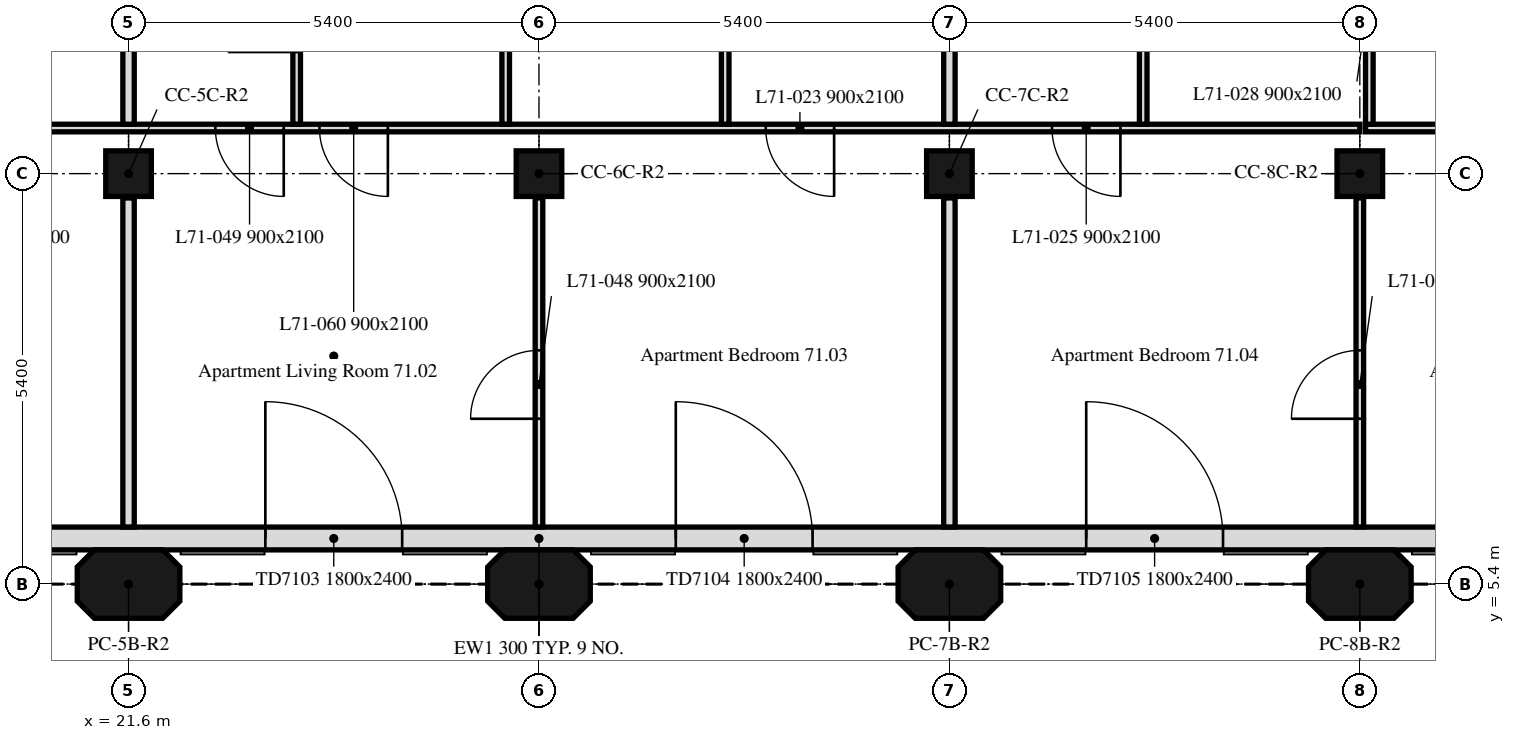
"""IFC4 building model, lengths in metres.
Left out: names, types, materials, properties, quantities, classifications, styles, units other than length and angle.
Written with IfcOpenShell. Run it as: python <this file> out.ifc"""

import sys

from ifc_helpers import new_model, si_unit, direction, frame, frame_2d, origin, origin_2d, place, context, subcontext, project, spatial, polyline, rectangle, outline, extrude, element, fill, save


model = new_model("IFC4")
c1 = context("Model", 3, precision=1e-05, world=origin(), true_north=direction((0.0, 1.0)))
c2 = subcontext(c1, "Body", "Model", "MODEL_VIEW")
j1 = project(units=[si_unit("LENGTHUNIT", "METRE"), si_unit("PLANEANGLEUNIT", "RADIAN")], contexts=[c1])
p1 = place(None, origin())
s1 = spatial("IfcSite", under=j1, at=p1, CompositionType="ELEMENT")
p2 = place(p1, origin())
s2 = spatial("IfcBuilding", under=s1, at=p2, CompositionType="ELEMENT")
p3 = place(p2, frame((0.0, 0.0, 288.4)))
s3 = spatial("IfcBuildingStorey", under=s2, at=p3, CompositionType="ELEMENT", Elevation=288.4)
for number, where, z_axis, x_axis in (
    (1, (21.6, 5.4, 0.0), (0.0, 0.0, 1.0), (1.0, 0.0, 0.0)),
    (2, (27.0, 5.4, 0.0), (0.0, 0.0, 1.0), (1.0, 0.0, 0.0)),
    (3, (32.4, 5.4, 0.0), (0.0, 0.0, 1.0), (1.0, 0.0, 0.0)),
    (4, (37.8, 5.4, 0.0), (0.0, 0.0, 1.0), (1.0, 0.0, 0.0)),
):
    element("IfcColumn", number, at=place(p3, frame(where, z_axis=z_axis, x_axis=x_axis)), inside=s3, PredefinedType="COLUMN", context=c2, shape_type="SweptSolid", body=[
        extrude(outline(polyline([(-0.45, -0.45), (0.45, -0.45), (0.675, -0.225), (0.675, 0.225), (0.45, 0.45), (-0.45, 0.45), (-0.675, 0.225), (-0.675, -0.225), (-0.45, -0.45)])), origin(), (0.0, 0.0, 1.0), 3.0),
    ])
for number, where, z_axis, x_axis in (
    (5, (21.6, 10.8, 0.0), (0.0, 0.0, 1.0), (1.0, 0.0, 0.0)),
    (6, (27.0, 10.8, 0.0), (0.0, 0.0, 1.0), (1.0, 0.0, 0.0)),
    (7, (32.4, 10.8, 0.0), (0.0, 0.0, 1.0), (1.0, 0.0, 0.0)),
    (8, (37.8, 10.8, 0.0), (0.0, 0.0, 1.0), (1.0, 0.0, 0.0)),
):
    element("IfcColumn", number, at=place(p3, frame(where, z_axis=z_axis, x_axis=x_axis)), inside=s3, PredefinedType="COLUMN", context=c2, shape_type="SweptSolid", body=[
        extrude(rectangle(XDim=0.6, YDim=0.6, at=origin_2d()), origin(), (0.0, 0.0, 1.0), 3.0),
    ])
p4 = place(p3, frame((10.986, 6.0, 0.0), z_axis=(0.0, 0.0, 1.0), x_axis=(1.0, 0.0, 0.0)))
e9 = element("IfcWall", 9, at=p4, inside=s3, PredefinedType="SOLIDWALL", context=c2, shape_type="SweptSolid", body=[
    extrude(rectangle(XDim=32.027, YDim=0.3, at=frame_2d((16.014, 0.0))), origin(), (0.0, 0.0, 1.0), 3.0),
])
p5 = place(p4, frame((1.614, 0.0, 0.0)))
e10 = element("IfcOpeningElement", 10, at=p5, cuts=e9, PredefinedType="OPENING", context=c2, shape_type="SweptSolid", body=[
    extrude(rectangle(XDim=1.8, YDim=2.4, at=frame_2d((0.9, 1.2))), frame((0.0, 0.16, 0.0), z_axis=(0.0, -1.0, 0.0), x_axis=(1.0, 0.0, 0.0)), (0.0, 0.0, 1.0), 0.32),
])
p6 = place(p4, frame((7.014, 0.0, 0.0)))
e11 = element("IfcOpeningElement", 11, at=p6, cuts=e9, PredefinedType="OPENING", context=c2, shape_type="SweptSolid", body=[
    extrude(rectangle(XDim=1.8, YDim=2.4, at=frame_2d((0.9, 1.2))), frame((0.0, 0.16, 0.0), z_axis=(0.0, -1.0, 0.0), x_axis=(1.0, 0.0, 0.0)), (0.0, 0.0, 1.0), 0.32),
])
p7 = place(p4, frame((12.414, 0.0, 0.0)))
e12 = element("IfcOpeningElement", 12, at=p7, cuts=e9, PredefinedType="OPENING", context=c2, shape_type="SweptSolid", body=[
    extrude(rectangle(XDim=1.8, YDim=2.4, at=frame_2d((0.9, 1.2))), frame((0.0, 0.16, 0.0), z_axis=(0.0, -1.0, 0.0), x_axis=(1.0, 0.0, 0.0)), (0.0, 0.0, 1.0), 0.32),
])
p8 = place(p4, frame((17.814, 0.0, 0.0)))
e13 = element("IfcOpeningElement", 13, at=p8, cuts=e9, PredefinedType="OPENING", context=c2, shape_type="SweptSolid", body=[
    extrude(rectangle(XDim=1.8, YDim=2.4, at=frame_2d((0.9, 1.2))), frame((0.0, 0.16, 0.0), z_axis=(0.0, -1.0, 0.0), x_axis=(1.0, 0.0, 0.0)), (0.0, 0.0, 1.0), 0.32),
])
p9 = place(p4, frame((23.214, 0.0, 0.0)))
e14 = element("IfcOpeningElement", 14, at=p9, cuts=e9, PredefinedType="OPENING", context=c2, shape_type="SweptSolid", body=[
    extrude(rectangle(XDim=1.8, YDim=2.4, at=frame_2d((0.9, 1.2))), frame((0.0, 0.16, 0.0), z_axis=(0.0, -1.0, 0.0), x_axis=(1.0, 0.0, 0.0)), (0.0, 0.0, 1.0), 0.32),
])
p10 = place(p4, frame((28.614, 0.0, 0.0)))
e15 = element("IfcOpeningElement", 15, at=p10, cuts=e9, PredefinedType="OPENING", context=c2, shape_type="SweptSolid", body=[
    extrude(rectangle(XDim=1.8, YDim=2.4, at=frame_2d((0.9, 1.2))), frame((0.0, 0.16, 0.0), z_axis=(0.0, -1.0, 0.0), x_axis=(1.0, 0.0, 0.0)), (0.0, 0.0, 1.0), 0.32),
])
p11 = place(p3, frame((37.8, 11.4, 0.0), z_axis=(0.0, 0.0, 1.0), x_axis=(-1.0, 0.0, 0.0)))
e16 = element("IfcWall", 16, at=p11, inside=s3, PredefinedType="PARTITIONING", context=c2, shape_type="SweptSolid", body=[
    extrude(rectangle(XDim=21.6, YDim=0.1, at=frame_2d((10.8, 0.0))), origin(), (0.0, 0.0, 1.0), 3.0),
])
p12 = place(p11, frame((18.87, 0.0, 0.0)))
e17 = element("IfcOpeningElement", 17, at=p12, cuts=e16, PredefinedType="OPENING", context=c2, shape_type="SweptSolid", body=[
    extrude(rectangle(XDim=0.9, YDim=2.1, at=frame_2d((0.45, 1.05))), frame((0.0, 0.05, 0.0), z_axis=(0.0, -1.0, 0.0), x_axis=(1.0, 0.0, 0.0)), (0.0, 0.0, 1.0), 0.1),
])
p13 = place(p11, frame((17.5, 0.0, 0.0)))
e18 = element("IfcOpeningElement", 18, at=p13, cuts=e16, PredefinedType="OPENING", context=c2, shape_type="SweptSolid", body=[
    extrude(rectangle(XDim=0.9, YDim=2.1, at=frame_2d((0.45, 1.05))), frame((0.0, 0.05, 0.0), z_axis=(0.0, -1.0, 0.0), x_axis=(1.0, 0.0, 0.0)), (0.0, 0.0, 1.0), 0.1),
])
p14 = place(p11, frame((6.917, 0.0, 0.0)))
e19 = element("IfcOpeningElement", 19, at=p14, cuts=e16, PredefinedType="OPENING", context=c2, shape_type="SweptSolid", body=[
    extrude(rectangle(XDim=0.9, YDim=2.1, at=frame_2d((0.45, 1.05))), frame((0.0, 0.05, 0.0), z_axis=(0.0, -1.0, 0.0), x_axis=(1.0, 0.0, 0.0)), (0.0, 0.0, 1.0), 0.1),
])
p15 = place(p11, frame((3.15, 0.0, 0.0)))
e20 = element("IfcOpeningElement", 20, at=p15, cuts=e16, PredefinedType="OPENING", context=c2, shape_type="SweptSolid", body=[
    extrude(rectangle(XDim=0.9, YDim=2.1, at=frame_2d((0.45, 1.05))), frame((0.0, 0.05, 0.0), z_axis=(0.0, -1.0, 0.0), x_axis=(1.0, 0.0, 0.0)), (0.0, 0.0, 1.0), 0.1),
])
p16 = place(p11, frame((14.158, 0.0, 0.0)))
e21 = element("IfcOpeningElement", 21, at=p16, cuts=e16, PredefinedType="OPENING", context=c2, shape_type="SweptSolid", body=[
    extrude(rectangle(XDim=0.9, YDim=2.1, at=frame_2d((0.45, 1.05))), frame((0.0, 0.05, 0.0), z_axis=(0.0, -1.0, 0.0), x_axis=(1.0, 0.0, 0.0)), (0.0, 0.0, 1.0), 0.1),
])
p17 = place(p11, frame((12.788, 0.0, 0.0)))
e22 = element("IfcOpeningElement", 22, at=p17, cuts=e16, PredefinedType="OPENING", context=c2, shape_type="SweptSolid", body=[
    extrude(rectangle(XDim=0.9, YDim=2.1, at=frame_2d((0.45, 1.05))), frame((0.0, 0.05, 0.0), z_axis=(0.0, -1.0, 0.0), x_axis=(1.0, 0.0, 0.0)), (0.0, 0.0, 1.0), 0.1),
])
p18 = place(p3, frame((21.6, 6.151, 0.0), z_axis=(0.0, 0.0, 1.0), x_axis=(0.0, 1.0, 0.0)))
e23 = element("IfcWall", 23, at=p18, inside=s3, PredefinedType="PARTITIONING", context=c2, shape_type="SweptSolid", body=[
    extrude(rectangle(XDim=4.329, YDim=0.15, at=frame_2d((2.165, 0.0))), origin(), (0.0, 0.0, 1.0), 3.0),
])
p19 = place(p3, frame((21.6, 11.45, 0.0), z_axis=(0.0, 0.0, 1.0), x_axis=(0.0, 1.0, 0.0)))
e24 = element("IfcWall", 24, at=p19, inside=s3, PredefinedType="PARTITIONING", context=c2, shape_type="SweptSolid", body=[
    extrude(rectangle(XDim=2.425, YDim=0.15, at=frame_2d((1.212, 0.0))), origin(), (0.0, 0.0, 1.0), 3.0),
])
p20 = place(p3, frame((27.0, 6.151, 0.0), z_axis=(0.0, 0.0, 1.0), x_axis=(0.0, 1.0, 0.0)))
e25 = element("IfcWall", 25, at=p20, inside=s3, PredefinedType="PARTITIONING", context=c2, shape_type="SweptSolid", body=[
    extrude(rectangle(XDim=4.329, YDim=0.1, at=frame_2d((2.165, 0.0))), origin(), (0.0, 0.0, 1.0), 3.0),
])
p21 = place(p20, frame((1.424, 0.0, 0.0)))
e26 = element("IfcOpeningElement", 26, at=p21, cuts=e25, PredefinedType="OPENING", context=c2, shape_type="SweptSolid", body=[
    extrude(rectangle(XDim=0.9, YDim=2.1, at=frame_2d((0.45, 1.05))), frame((0.0, 0.05, 0.0), z_axis=(0.0, -1.0, 0.0), x_axis=(1.0, 0.0, 0.0)), (0.0, 0.0, 1.0), 0.1),
])
p22 = place(p3, frame((32.4, 6.151, 0.0), z_axis=(0.0, 0.0, 1.0), x_axis=(0.0, 1.0, 0.0)))
e27 = element("IfcWall", 27, at=p22, inside=s3, PredefinedType="PARTITIONING", context=c2, shape_type="SweptSolid", body=[
    extrude(rectangle(XDim=4.329, YDim=0.15, at=frame_2d((2.165, 0.0))), origin(), (0.0, 0.0, 1.0), 3.0),
])
p23 = place(p3, frame((23.812, 11.45, 0.0), z_axis=(0.0, 0.0, 1.0), x_axis=(0.0, 1.0, 0.0)))
e28 = element("IfcWall", 28, at=p23, inside=s3, PredefinedType="PARTITIONING", context=c2, shape_type="SweptSolid", body=[
    extrude(rectangle(XDim=2.425, YDim=0.1, at=frame_2d((1.212, 0.0))), origin(), (0.0, 0.0, 1.0), 3.0),
])
p24 = place(p23, frame((0.95, 0.0, 0.0)))
e29 = element("IfcOpeningElement", 29, at=p24, cuts=e28, PredefinedType="OPENING", context=c2, shape_type="SweptSolid", body=[
    extrude(rectangle(XDim=0.9, YDim=2.1, at=frame_2d((0.45, 1.05))), frame((0.0, 0.05, 0.0), z_axis=(0.0, -1.0, 0.0), x_axis=(1.0, 0.0, 0.0)), (0.0, 0.0, 1.0), 0.1),
])
p25 = place(p3, frame((26.562, 11.45, 0.0), z_axis=(0.0, 0.0, 1.0), x_axis=(0.0, 1.0, 0.0)))
e30 = element("IfcWall", 30, at=p25, inside=s3, PredefinedType="PARTITIONING", context=c2, shape_type="SweptSolid", body=[
    extrude(rectangle(XDim=2.425, YDim=0.1, at=frame_2d((1.212, 0.0))), origin(), (0.0, 0.0, 1.0), 3.0),
])
p26 = place(p25, frame((1.275, 0.0, 0.0)))
e31 = element("IfcOpeningElement", 31, at=p26, cuts=e30, PredefinedType="OPENING", context=c2, shape_type="SweptSolid", body=[
    extrude(rectangle(XDim=0.9, YDim=2.1, at=frame_2d((0.45, 1.05))), frame((0.0, 0.05, 0.0), z_axis=(0.0, -1.0, 0.0), x_axis=(1.0, 0.0, 0.0)), (0.0, 0.0, 1.0), 0.1),
])
p27 = place(p3, frame((29.45, 11.45, 0.0), z_axis=(0.0, 0.0, 1.0), x_axis=(0.0, 1.0, 0.0)))
e32 = element("IfcWall", 32, at=p27, inside=s3, PredefinedType="PARTITIONING", context=c2, shape_type="SweptSolid", body=[
    extrude(rectangle(XDim=2.425, YDim=0.1, at=frame_2d((1.212, 0.0))), origin(), (0.0, 0.0, 1.0), 3.0),
])
p28 = place(p3, frame((32.4, 11.45, 0.0), z_axis=(0.0, 0.0, 1.0), x_axis=(0.0, 1.0, 0.0)))
e33 = element("IfcWall", 33, at=p28, inside=s3, PredefinedType="PARTITIONING", context=c2, shape_type="SweptSolid", body=[
    extrude(rectangle(XDim=2.425, YDim=0.15, at=frame_2d((1.212, 0.0))), origin(), (0.0, 0.0, 1.0), 3.0),
])
p29 = place(p3, frame((37.8, 6.151, 0.0), z_axis=(0.0, 0.0, 1.0), x_axis=(0.0, 1.0, 0.0)))
e34 = element("IfcWall", 34, at=p29, inside=s3, PredefinedType="PARTITIONING", context=c2, shape_type="SweptSolid", body=[
    extrude(rectangle(XDim=4.329, YDim=0.1, at=frame_2d((2.165, 0.0))), origin(), (0.0, 0.0, 1.0), 3.0),
])
p30 = place(p29, frame((1.424, 0.0, 0.0)))
e35 = element("IfcOpeningElement", 35, at=p30, cuts=e34, PredefinedType="OPENING", context=c2, shape_type="SweptSolid", body=[
    extrude(rectangle(XDim=0.9, YDim=2.1, at=frame_2d((0.45, 1.05))), frame((0.0, 0.05, 0.0), z_axis=(0.0, -1.0, 0.0), x_axis=(1.0, 0.0, 0.0)), (0.0, 0.0, 1.0), 0.1),
])
p31 = place(p3, frame((47.849, 11.4, 0.0), z_axis=(0.0, 0.0, 1.0), x_axis=(-1.0, 0.0, 0.0)))
e36 = element("IfcWall", 36, at=p31, inside=s3, PredefinedType="PARTITIONING", context=c2, shape_type="SweptSolid", body=[
    extrude(rectangle(XDim=9.974, YDim=0.1, at=frame_2d((4.987, 0.0))), origin(), (0.0, 0.0, 1.0), 3.0),
])
p32 = place(p31, frame((1.909, 0.0, 0.0)))
e37 = element("IfcOpeningElement", 37, at=p32, cuts=e36, PredefinedType="OPENING", context=c2, shape_type="SweptSolid", body=[
    extrude(rectangle(XDim=0.9, YDim=2.1, at=frame_2d((0.45, 1.05))), frame((0.0, 0.05, 0.0), z_axis=(0.0, -1.0, 0.0), x_axis=(1.0, 0.0, 0.0)), (0.0, 0.0, 1.0), 0.1),
])
p33 = place(p31, frame((0.354, 0.0, 0.0)))
e38 = element("IfcOpeningElement", 38, at=p33, cuts=e36, PredefinedType="OPENING", context=c2, shape_type="SweptSolid", body=[
    extrude(rectangle(XDim=0.9, YDim=2.1, at=frame_2d((0.45, 1.05))), frame((0.0, 0.05, 0.0), z_axis=(0.0, -1.0, 0.0), x_axis=(1.0, 0.0, 0.0)), (0.0, 0.0, 1.0), 0.1),
])
p34 = place(p31, frame((7.474, 0.0, 0.0)))
e39 = element("IfcOpeningElement", 39, at=p34, cuts=e36, PredefinedType="OPENING", context=c2, shape_type="SweptSolid", body=[
    extrude(rectangle(XDim=0.9, YDim=2.1, at=frame_2d((0.45, 1.05))), frame((0.0, 0.05, 0.0), z_axis=(0.0, -1.0, 0.0), x_axis=(1.0, 0.0, 0.0)), (0.0, 0.0, 1.0), 0.1),
])
p35 = place(p3, frame((34.95, 11.45, 0.0), z_axis=(0.0, 0.0, 1.0), x_axis=(0.0, 1.0, 0.0)))
e40 = element("IfcWall", 40, at=p35, inside=s3, PredefinedType="PARTITIONING", context=c2, shape_type="SweptSolid", body=[
    extrude(rectangle(XDim=2.425, YDim=0.1, at=frame_2d((1.212, 0.0))), origin(), (0.0, 0.0, 1.0), 3.0),
])
p36 = place(p3, frame((37.925, 11.45, 0.0), z_axis=(0.0, 0.0, 1.0), x_axis=(0.0, 1.0, 0.0)))
e41 = element("IfcWall", 41, at=p36, inside=s3, PredefinedType="PARTITIONING", context=c2, shape_type="SweptSolid", body=[
    extrude(rectangle(XDim=2.425, YDim=0.1, at=frame_2d((1.212, 0.0))), origin(), (0.0, 0.0, 1.0), 3.0),
])
p37 = place(p36, frame((1.275, 0.0, 0.0)))
e42 = element("IfcOpeningElement", 42, at=p37, cuts=e41, PredefinedType="OPENING", context=c2, shape_type="SweptSolid", body=[
    extrude(rectangle(XDim=0.9, YDim=2.1, at=frame_2d((0.45, 1.05))), frame((0.0, 0.05, 0.0), z_axis=(0.0, -1.0, 0.0), x_axis=(1.0, 0.0, 0.0)), (0.0, 0.0, 1.0), 0.1),
])
p38 = place(p7, origin())
e43 = element("IfcDoor", 43, at=p38, inside=s3, OperationType="DOUBLE_DOOR_DOUBLE_SWING", PredefinedType="DOOR", context=c2, shape_type="SweptSolid", body=[
    extrude(rectangle(XDim=1.8, YDim=2.4, at=frame_2d((0.9, 1.2))), frame((0.0, 0.025, 0.0), z_axis=(0.0, -1.0, 0.0), x_axis=(1.0, 0.0, 0.0)), (0.0, 0.0, 1.0), 0.05),
])
fill(e12, e43)
p39 = place(p8, origin())
e44 = element("IfcDoor", 44, at=p39, inside=s3, OperationType="DOUBLE_DOOR_DOUBLE_SWING", PredefinedType="DOOR", context=c2, shape_type="SweptSolid", body=[
    extrude(rectangle(XDim=1.8, YDim=2.4, at=frame_2d((0.9, 1.2))), frame((0.0, 0.025, 0.0), z_axis=(0.0, -1.0, 0.0), x_axis=(1.0, 0.0, 0.0)), (0.0, 0.0, 1.0), 0.05),
])
fill(e13, e44)
p40 = place(p9, origin())
e45 = element("IfcDoor", 45, at=p40, inside=s3, OperationType="DOUBLE_DOOR_DOUBLE_SWING", PredefinedType="DOOR", context=c2, shape_type="SweptSolid", body=[
    extrude(rectangle(XDim=1.8, YDim=2.4, at=frame_2d((0.9, 1.2))), frame((0.0, 0.025, 0.0), z_axis=(0.0, -1.0, 0.0), x_axis=(1.0, 0.0, 0.0)), (0.0, 0.0, 1.0), 0.05),
])
fill(e14, e45)
p41 = place(p14, origin())
e46 = element("IfcDoor", 46, at=p41, inside=s3, OperationType="SINGLE_SWING_LEFT", PredefinedType="DOOR", context=c2, shape_type="SweptSolid", body=[
    extrude(rectangle(XDim=0.9, YDim=2.1, at=frame_2d((0.45, 1.05))), frame((0.0, 0.025, 0.0), z_axis=(0.0, -1.0, 0.0), x_axis=(1.0, 0.0, 0.0)), (0.0, 0.0, 1.0), 0.05),
])
fill(e19, e46)
p42 = place(p15, origin())
e47 = element("IfcDoor", 47, at=p42, inside=s3, OperationType="SINGLE_SWING_RIGHT", PredefinedType="DOOR", context=c2, shape_type="SweptSolid", body=[
    extrude(rectangle(XDim=0.9, YDim=2.1, at=frame_2d((0.45, 1.05))), frame((0.0, 0.025, 0.0), z_axis=(0.0, -1.0, 0.0), x_axis=(1.0, 0.0, 0.0)), (0.0, 0.0, 1.0), 0.05),
])
fill(e20, e47)
p43 = place(p21, origin())
e48 = element("IfcDoor", 48, at=p43, inside=s3, OperationType="SINGLE_SWING_RIGHT", PredefinedType="DOOR", context=c2, shape_type="SweptSolid", body=[
    extrude(rectangle(XDim=0.9, YDim=2.1, at=frame_2d((0.45, 1.05))), frame((0.0, 0.025, 0.0), z_axis=(0.0, -1.0, 0.0), x_axis=(1.0, 0.0, 0.0)), (0.0, 0.0, 1.0), 0.05),
])
fill(e26, e48)
p44 = place(p16, origin())
e49 = element("IfcDoor", 49, at=p44, inside=s3, OperationType="SINGLE_SWING_RIGHT", PredefinedType="DOOR", context=c2, shape_type="SweptSolid", body=[
    extrude(rectangle(XDim=0.9, YDim=2.1, at=frame_2d((0.45, 1.05))), frame((0.0, 0.025, 0.0), z_axis=(0.0, -1.0, 0.0), x_axis=(1.0, 0.0, 0.0)), (0.0, 0.0, 1.0), 0.05),
])
fill(e21, e49)
p45 = place(p30, origin())
e50 = element("IfcDoor", 50, at=p45, inside=s3, OperationType="SINGLE_SWING_LEFT", PredefinedType="DOOR", context=c2, shape_type="SweptSolid", body=[
    extrude(rectangle(XDim=0.9, YDim=2.1, at=frame_2d((0.45, 1.05))), frame((0.0, 0.025, 0.0), z_axis=(0.0, -1.0, 0.0), x_axis=(1.0, 0.0, 0.0)), (0.0, 0.0, 1.0), 0.05),
])
fill(e35, e50)
p46 = place(p17, origin())
e51 = element("IfcDoor", 51, at=p46, inside=s3, OperationType="SINGLE_SWING_LEFT", PredefinedType="DOOR", context=c2, shape_type="SweptSolid", body=[
    extrude(rectangle(XDim=0.9, YDim=2.1, at=frame_2d((0.45, 1.05))), frame((0.0, 0.025, 0.0), z_axis=(0.0, -1.0, 0.0), x_axis=(1.0, 0.0, 0.0)), (0.0, 0.0, 1.0), 0.05),
])
fill(e22, e51)
save(model, sys.argv[1])
